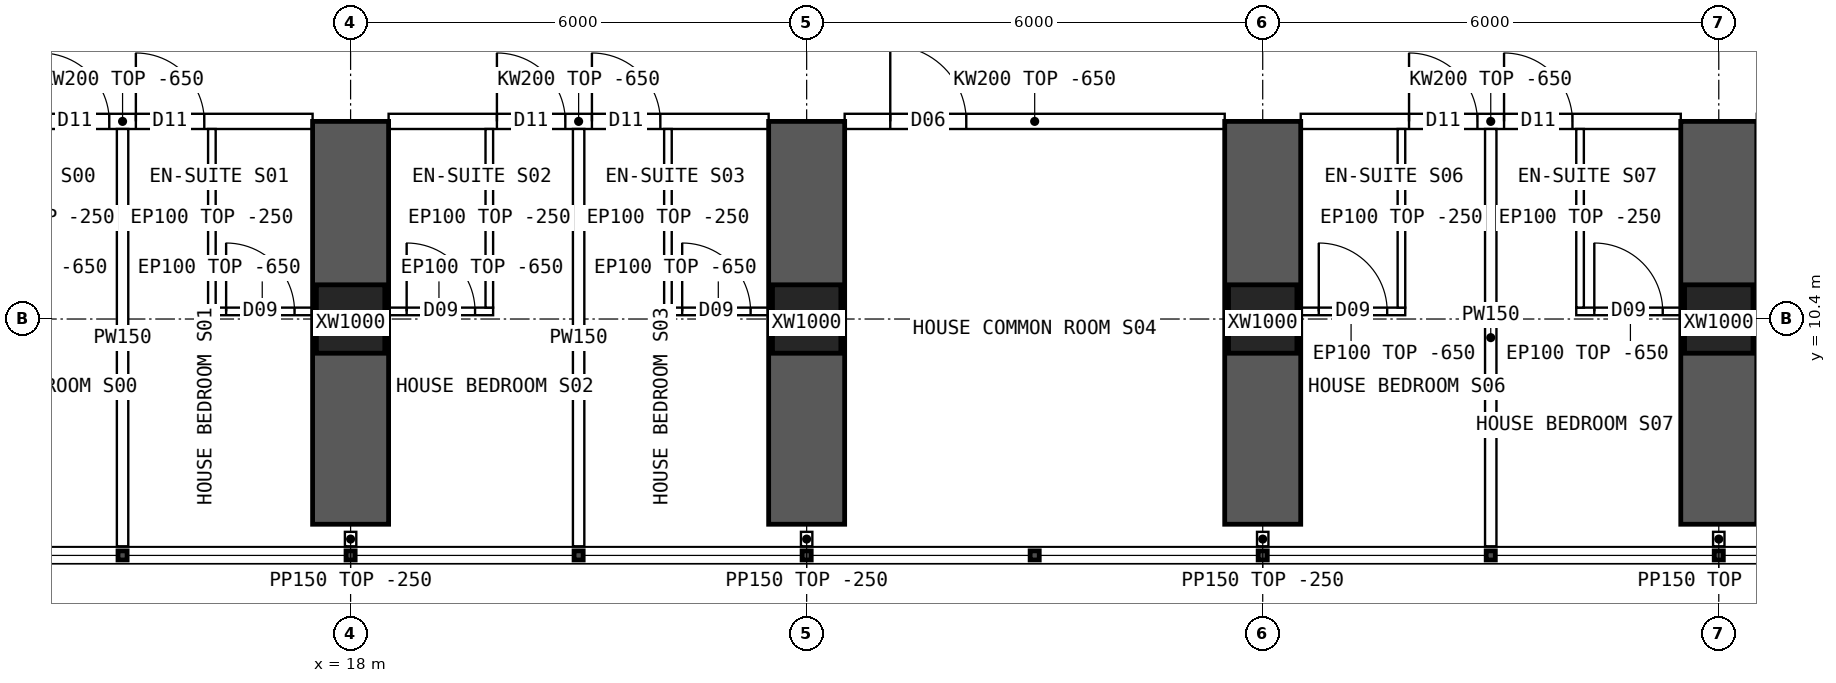
"""IFC4 building model, lengths in metres.
Left out: names, types, materials, properties, quantities, classifications, styles, units other than length and angle.
Written with IfcOpenShell. Run it as: python <this file> out.ifc"""

import sys

from ifc_helpers import new_model, si_unit, direction, frame, frame_2d, origin, origin_2d, place, context, subcontext, project, spatial, polyline, rectangle, hollow_rectangle, outline, extrude, element, fill, save


model = new_model("IFC4")
c1 = context("Model", 3, precision=1e-05, world=origin(), true_north=direction((0.0, 1.0)))
c2 = subcontext(c1, "Body", "Model", "MODEL_VIEW")
j1 = project(units=[si_unit("LENGTHUNIT", "METRE"), si_unit("PLANEANGLEUNIT", "RADIAN")], contexts=[c1])
p1 = place(None, origin())
s1 = spatial("IfcSite", under=j1, at=p1, CompositionType="ELEMENT")
p2 = place(p1, origin())
s2 = spatial("IfcBuilding", under=s1, at=p2, CompositionType="ELEMENT")
p3 = place(p2, frame((0.0, 0.0, 23.95)))
s3 = spatial("IfcBuildingStorey", under=s2, at=p3, CompositionType="ELEMENT", Elevation=23.95)
for number, where, z_axis, x_axis in (
    (1, (18.0, 10.4, 0.0), (0.0, 0.0, 1.0), (1.0, 0.0, 0.0)),
    (2, (24.0, 10.4, 0.0), (0.0, 0.0, 1.0), (1.0, 0.0, 0.0)),
    (3, (30.0, 10.4, 0.0), (0.0, 0.0, 1.0), (1.0, 0.0, 0.0)),
    (4, (36.0, 10.4, 0.0), (0.0, 0.0, 1.0), (1.0, 0.0, 0.0)),
):
    element("IfcColumn", number, at=place(p3, frame(where, z_axis=z_axis, x_axis=x_axis)), inside=s3, PredefinedType="COLUMN", context=c2, shape_type="SweptSolid", body=[
        extrude(hollow_rectangle(XDim=0.9, YDim=0.9, WallThickness=0.09, at=origin_2d()), origin(), (0.0, 0.0, 1.0), 3.75),
    ])
for number, where, z_axis, x_axis in (
    (5, (18.0, 7.7, 0.0), (0.0, 0.0, 1.0), (0.0, 1.0, 0.0)),
    (6, (24.0, 7.7, 0.0), (0.0, 0.0, 1.0), (0.0, 1.0, 0.0)),
    (7, (30.0, 7.7, 0.0), (0.0, 0.0, 1.0), (0.0, 1.0, 0.0)),
    (8, (36.0, 7.7, 0.0), (0.0, 0.0, 1.0), (0.0, 1.0, 0.0)),
):
    element("IfcWall", number, at=place(p3, frame(where, z_axis=z_axis, x_axis=x_axis)), inside=s3, PredefinedType="SHEAR", context=c2, shape_type="SweptSolid", body=[
        extrude(rectangle(XDim=5.3, YDim=1.0, at=frame_2d((2.65, 0.0))), origin(), (0.0, 0.0, 1.0), 3.75),
    ])
p4 = place(p3, frame((12.5, 13.0, 0.0), z_axis=(0.0, 0.0, 1.0), x_axis=(1.0, 0.0, 0.0)))
e9 = element("IfcWall", 9, at=p4, inside=s3, PredefinedType="SOLIDWALL", context=c2, shape_type="SweptSolid", body=[
    extrude(outline(polyline([(0.0, 0.0), (5.0, 0.0), (5.0, 3.1), (0.0, 3.1), (0.0, 0.0)])), frame((0.0, 0.1, 0.0), z_axis=(0.0, -1.0, 0.0), x_axis=(1.0, 0.0, 0.0)), (0.0, 0.0, 1.0), 0.2),
])
p5 = place(p4, frame((1.425, 0.0, 0.0)))
e10 = element("IfcOpeningElement", 10, at=p5, cuts=e9, PredefinedType="OPENING", context=c2, shape_type="SweptSolid", body=[
    extrude(rectangle(XDim=0.9, YDim=2.1, at=frame_2d((0.45, 1.05))), frame((0.0, 0.11, 0.0), z_axis=(0.0, -1.0, 0.0), x_axis=(1.0, 0.0, 0.0)), (0.0, 0.0, 1.0), 0.22),
])
p6 = place(p4, frame((2.675, 0.0, 0.0)))
e11 = element("IfcOpeningElement", 11, at=p6, cuts=e9, PredefinedType="OPENING", context=c2, shape_type="SweptSolid", body=[
    extrude(rectangle(XDim=0.9, YDim=2.1, at=frame_2d((0.45, 1.05))), frame((0.0, 0.11, 0.0), z_axis=(0.0, -1.0, 0.0), x_axis=(1.0, 0.0, 0.0)), (0.0, 0.0, 1.0), 0.22),
])
p7 = place(p3, frame((18.5, 13.0, 0.0), z_axis=(0.0, 0.0, 1.0), x_axis=(1.0, 0.0, 0.0)))
e12 = element("IfcWall", 12, at=p7, inside=s3, PredefinedType="SOLIDWALL", context=c2, shape_type="SweptSolid", body=[
    extrude(outline(polyline([(0.0, 0.0), (5.0, 0.0), (5.0, 3.1), (0.0, 3.1), (0.0, 0.0)])), frame((0.0, 0.1, 0.0), z_axis=(0.0, -1.0, 0.0), x_axis=(1.0, 0.0, 0.0)), (0.0, 0.0, 1.0), 0.2),
])
p8 = place(p7, frame((1.425, 0.0, 0.0)))
e13 = element("IfcOpeningElement", 13, at=p8, cuts=e12, PredefinedType="OPENING", context=c2, shape_type="SweptSolid", body=[
    extrude(rectangle(XDim=0.9, YDim=2.1, at=frame_2d((0.45, 1.05))), frame((0.0, 0.11, 0.0), z_axis=(0.0, -1.0, 0.0), x_axis=(1.0, 0.0, 0.0)), (0.0, 0.0, 1.0), 0.22),
])
p9 = place(p7, frame((2.675, 0.0, 0.0)))
e14 = element("IfcOpeningElement", 14, at=p9, cuts=e12, PredefinedType="OPENING", context=c2, shape_type="SweptSolid", body=[
    extrude(rectangle(XDim=0.9, YDim=2.1, at=frame_2d((0.45, 1.05))), frame((0.0, 0.11, 0.0), z_axis=(0.0, -1.0, 0.0), x_axis=(1.0, 0.0, 0.0)), (0.0, 0.0, 1.0), 0.22),
])
p10 = place(p3, frame((24.5, 13.0, 0.0), z_axis=(0.0, 0.0, 1.0), x_axis=(1.0, 0.0, 0.0)))
e15 = element("IfcWall", 15, at=p10, inside=s3, PredefinedType="SOLIDWALL", context=c2, shape_type="SweptSolid", body=[
    extrude(outline(polyline([(0.0, 0.0), (5.0, 0.0), (5.0, 3.1), (0.0, 3.1), (0.0, 0.0)])), frame((0.0, 0.1, 0.0), z_axis=(0.0, -1.0, 0.0), x_axis=(1.0, 0.0, 0.0)), (0.0, 0.0, 1.0), 0.2),
])
p11 = place(p10, frame((0.6, 0.0, 0.0)))
e16 = element("IfcOpeningElement", 16, at=p11, cuts=e15, PredefinedType="OPENING", context=c2, shape_type="SweptSolid", body=[
    extrude(rectangle(XDim=1.0, YDim=2.1, at=frame_2d((0.5, 1.05))), frame((0.0, 0.11, 0.0), z_axis=(0.0, -1.0, 0.0), x_axis=(1.0, 0.0, 0.0)), (0.0, 0.0, 1.0), 0.22),
])
p12 = place(p3, frame((30.5, 13.0, 0.0), z_axis=(0.0, 0.0, 1.0), x_axis=(1.0, 0.0, 0.0)))
e17 = element("IfcWall", 17, at=p12, inside=s3, PredefinedType="SOLIDWALL", context=c2, shape_type="SweptSolid", body=[
    extrude(outline(polyline([(0.0, 0.0), (5.0, 0.0), (5.0, 3.1), (0.0, 3.1), (0.0, 0.0)])), frame((0.0, 0.1, 0.0), z_axis=(0.0, -1.0, 0.0), x_axis=(1.0, 0.0, 0.0)), (0.0, 0.0, 1.0), 0.2),
])
p13 = place(p12, frame((1.425, 0.0, 0.0)))
e18 = element("IfcOpeningElement", 18, at=p13, cuts=e17, PredefinedType="OPENING", context=c2, shape_type="SweptSolid", body=[
    extrude(rectangle(XDim=0.9, YDim=2.1, at=frame_2d((0.45, 1.05))), frame((0.0, 0.11, 0.0), z_axis=(0.0, -1.0, 0.0), x_axis=(1.0, 0.0, 0.0)), (0.0, 0.0, 1.0), 0.22),
])
p14 = place(p12, frame((2.675, 0.0, 0.0)))
e19 = element("IfcOpeningElement", 19, at=p14, cuts=e17, PredefinedType="OPENING", context=c2, shape_type="SweptSolid", body=[
    extrude(rectangle(XDim=0.9, YDim=2.1, at=frame_2d((0.45, 1.05))), frame((0.0, 0.11, 0.0), z_axis=(0.0, -1.0, 0.0), x_axis=(1.0, 0.0, 0.0)), (0.0, 0.0, 1.0), 0.22),
])
p15 = place(p3, frame((15.0, 7.41, 0.0), z_axis=(0.0, 0.0, 1.0), x_axis=(0.0, 1.0, 0.0)))
e20 = element("IfcWall", 20, at=p15, inside=s3, PredefinedType="PARTITIONING", context=c2, shape_type="SweptSolid", body=[
    extrude(outline(polyline([(0.0, 0.0), (5.49, 0.0), (5.49, 3.1), (5.442, 3.1), (5.44, 3.5), (3.192, 3.5), (3.19, 3.1), (2.792, 3.1), (2.79, 3.5), (0.0, 3.5), (0.0, 0.0)])), frame((0.0, 0.075, 0.0), z_axis=(0.0, -1.0, 0.0), x_axis=(1.0, 0.0, 0.0)), (0.0, 0.0, 1.0), 0.15),
])
p16 = place(p3, frame((17.55, 10.5, 0.0), z_axis=(0.0, 0.0, 1.0), x_axis=(-1.0, 0.0, 0.0)))
e21 = element("IfcWall", 21, at=p16, inside=s3, PredefinedType="PARTITIONING", context=c2, shape_type="SweptSolid", body=[
    extrude(outline(polyline([(0.0, 0.0), (1.425, 0.0), (1.425, 3.1), (0.0, 3.1), (0.0, 0.0)])), frame((0.0, 0.05, 0.0), z_axis=(0.0, -1.0, 0.0), x_axis=(1.0, 0.0, 0.0)), (0.0, 0.0, 1.0), 0.1),
])
p17 = place(p16, frame((0.288, 0.0, 0.0)))
e22 = element("IfcOpeningElement", 22, at=p17, cuts=e21, PredefinedType="OPENING", context=c2, shape_type="SweptSolid", body=[
    extrude(rectangle(XDim=0.9, YDim=2.1, at=frame_2d((0.45, 1.05))), frame((0.0, 0.06, 0.0), z_axis=(0.0, -1.0, 0.0), x_axis=(1.0, 0.0, 0.0)), (0.0, 0.0, 1.0), 0.12),
])
p18 = place(p3, frame((16.175, 10.55, 0.0), z_axis=(0.0, 0.0, 1.0), x_axis=(0.0, 1.0, 0.0)))
e23 = element("IfcWall", 23, at=p18, inside=s3, PredefinedType="PARTITIONING", context=c2, shape_type="SweptSolid", body=[
    extrude(outline(polyline([(0.0, 0.0), (2.35, 0.0), (2.35, 3.1), (2.302, 3.1), (2.3, 3.5), (0.052, 3.5), (0.05, 3.1), (0.0, 3.1), (0.0, 0.0)])), frame((0.0, 0.05, 0.0), z_axis=(0.0, -1.0, 0.0), x_axis=(1.0, 0.0, 0.0)), (0.0, 0.0, 1.0), 0.1),
])
p19 = place(p3, frame((21.0, 7.41, 0.0), z_axis=(0.0, 0.0, 1.0), x_axis=(0.0, 1.0, 0.0)))
e24 = element("IfcWall", 24, at=p19, inside=s3, PredefinedType="PARTITIONING", context=c2, shape_type="SweptSolid", body=[
    extrude(outline(polyline([(0.0, 0.0), (5.49, 0.0), (5.49, 3.1), (5.442, 3.1), (5.44, 3.5), (3.192, 3.5), (3.19, 3.1), (2.792, 3.1), (2.79, 3.5), (0.0, 3.5), (0.0, 0.0)])), frame((0.0, 0.075, 0.0), z_axis=(0.0, -1.0, 0.0), x_axis=(1.0, 0.0, 0.0)), (0.0, 0.0, 1.0), 0.15),
])
p20 = place(p3, frame((19.875, 10.5, 0.0), z_axis=(0.0, 0.0, 1.0), x_axis=(-1.0, 0.0, 0.0)))
e25 = element("IfcWall", 25, at=p20, inside=s3, PredefinedType="PARTITIONING", context=c2, shape_type="SweptSolid", body=[
    extrude(outline(polyline([(0.0, 0.0), (1.425, 0.0), (1.425, 3.1), (0.0, 3.1), (0.0, 0.0)])), frame((0.0, 0.05, 0.0), z_axis=(0.0, -1.0, 0.0), x_axis=(1.0, 0.0, 0.0)), (0.0, 0.0, 1.0), 0.1),
])
p21 = place(p20, frame((0.238, 0.0, 0.0)))
e26 = element("IfcOpeningElement", 26, at=p21, cuts=e25, PredefinedType="OPENING", context=c2, shape_type="SweptSolid", body=[
    extrude(rectangle(XDim=0.9, YDim=2.1, at=frame_2d((0.45, 1.05))), frame((0.0, 0.06, 0.0), z_axis=(0.0, -1.0, 0.0), x_axis=(1.0, 0.0, 0.0)), (0.0, 0.0, 1.0), 0.12),
])
p22 = place(p3, frame((19.825, 10.55, 0.0), z_axis=(0.0, 0.0, 1.0), x_axis=(0.0, 1.0, 0.0)))
e27 = element("IfcWall", 27, at=p22, inside=s3, PredefinedType="PARTITIONING", context=c2, shape_type="SweptSolid", body=[
    extrude(outline(polyline([(0.0, 0.0), (2.35, 0.0), (2.35, 3.1), (2.302, 3.1), (2.3, 3.5), (0.052, 3.5), (0.05, 3.1), (0.0, 3.1), (0.0, 0.0)])), frame((0.0, 0.05, 0.0), z_axis=(0.0, -1.0, 0.0), x_axis=(1.0, 0.0, 0.0)), (0.0, 0.0, 1.0), 0.1),
])
p23 = place(p3, frame((23.55, 10.5, 0.0), z_axis=(0.0, 0.0, 1.0), x_axis=(-1.0, 0.0, 0.0)))
e28 = element("IfcWall", 28, at=p23, inside=s3, PredefinedType="PARTITIONING", context=c2, shape_type="SweptSolid", body=[
    extrude(outline(polyline([(0.0, 0.0), (1.425, 0.0), (1.425, 3.1), (0.0, 3.1), (0.0, 0.0)])), frame((0.0, 0.05, 0.0), z_axis=(0.0, -1.0, 0.0), x_axis=(1.0, 0.0, 0.0)), (0.0, 0.0, 1.0), 0.1),
])
p24 = place(p23, frame((0.288, 0.0, 0.0)))
e29 = element("IfcOpeningElement", 29, at=p24, cuts=e28, PredefinedType="OPENING", context=c2, shape_type="SweptSolid", body=[
    extrude(rectangle(XDim=0.9, YDim=2.1, at=frame_2d((0.45, 1.05))), frame((0.0, 0.06, 0.0), z_axis=(0.0, -1.0, 0.0), x_axis=(1.0, 0.0, 0.0)), (0.0, 0.0, 1.0), 0.12),
])
p25 = place(p3, frame((22.175, 10.55, 0.0), z_axis=(0.0, 0.0, 1.0), x_axis=(0.0, 1.0, 0.0)))
e30 = element("IfcWall", 30, at=p25, inside=s3, PredefinedType="PARTITIONING", context=c2, shape_type="SweptSolid", body=[
    extrude(outline(polyline([(0.0, 0.0), (2.35, 0.0), (2.35, 3.1), (2.302, 3.1), (2.3, 3.5), (0.052, 3.5), (0.05, 3.1), (0.0, 3.1), (0.0, 0.0)])), frame((0.0, 0.05, 0.0), z_axis=(0.0, -1.0, 0.0), x_axis=(1.0, 0.0, 0.0)), (0.0, 0.0, 1.0), 0.1),
])
p26 = place(p3, frame((33.0, 7.41, 0.0), z_axis=(0.0, 0.0, 1.0), x_axis=(0.0, 1.0, 0.0)))
e31 = element("IfcWall", 31, at=p26, inside=s3, PredefinedType="PARTITIONING", context=c2, shape_type="SweptSolid", body=[
    extrude(outline(polyline([(0.0, 0.0), (5.49, 0.0), (5.49, 3.1), (5.442, 3.1), (5.44, 3.5), (3.192, 3.5), (3.19, 3.1), (2.792, 3.1), (2.79, 3.5), (0.0, 3.5), (0.0, 0.0)])), frame((0.0, 0.075, 0.0), z_axis=(0.0, -1.0, 0.0), x_axis=(1.0, 0.0, 0.0)), (0.0, 0.0, 1.0), 0.15),
])
p27 = place(p3, frame((31.875, 10.5, 0.0), z_axis=(0.0, 0.0, 1.0), x_axis=(-1.0, 0.0, 0.0)))
e32 = element("IfcWall", 32, at=p27, inside=s3, PredefinedType="PARTITIONING", context=c2, shape_type="SweptSolid", body=[
    extrude(outline(polyline([(0.0, 0.0), (1.425, 0.0), (1.425, 3.1), (0.0, 3.1), (0.0, 0.0)])), frame((0.0, 0.05, 0.0), z_axis=(0.0, -1.0, 0.0), x_axis=(1.0, 0.0, 0.0)), (0.0, 0.0, 1.0), 0.1),
])
p28 = place(p27, frame((0.238, 0.0, 0.0)))
e33 = element("IfcOpeningElement", 33, at=p28, cuts=e32, PredefinedType="OPENING", context=c2, shape_type="SweptSolid", body=[
    extrude(rectangle(XDim=0.9, YDim=2.1, at=frame_2d((0.45, 1.05))), frame((0.0, 0.06, 0.0), z_axis=(0.0, -1.0, 0.0), x_axis=(1.0, 0.0, 0.0)), (0.0, 0.0, 1.0), 0.12),
])
p29 = place(p3, frame((31.825, 10.55, 0.0), z_axis=(0.0, 0.0, 1.0), x_axis=(0.0, 1.0, 0.0)))
e34 = element("IfcWall", 34, at=p29, inside=s3, PredefinedType="PARTITIONING", context=c2, shape_type="SweptSolid", body=[
    extrude(outline(polyline([(0.0, 0.0), (2.35, 0.0), (2.35, 3.1), (2.302, 3.1), (2.3, 3.5), (0.052, 3.5), (0.05, 3.1), (0.0, 3.1), (0.0, 0.0)])), frame((0.0, 0.05, 0.0), z_axis=(0.0, -1.0, 0.0), x_axis=(1.0, 0.0, 0.0)), (0.0, 0.0, 1.0), 0.1),
])
p30 = place(p3, frame((35.55, 10.5, 0.0), z_axis=(0.0, 0.0, 1.0), x_axis=(-1.0, 0.0, 0.0)))
e35 = element("IfcWall", 35, at=p30, inside=s3, PredefinedType="PARTITIONING", context=c2, shape_type="SweptSolid", body=[
    extrude(outline(polyline([(0.0, 0.0), (1.425, 0.0), (1.425, 3.1), (0.0, 3.1), (0.0, 0.0)])), frame((0.0, 0.05, 0.0), z_axis=(0.0, -1.0, 0.0), x_axis=(1.0, 0.0, 0.0)), (0.0, 0.0, 1.0), 0.1),
])
p31 = place(p30, frame((0.288, 0.0, 0.0)))
e36 = element("IfcOpeningElement", 36, at=p31, cuts=e35, PredefinedType="OPENING", context=c2, shape_type="SweptSolid", body=[
    extrude(rectangle(XDim=0.9, YDim=2.1, at=frame_2d((0.45, 1.05))), frame((0.0, 0.06, 0.0), z_axis=(0.0, -1.0, 0.0), x_axis=(1.0, 0.0, 0.0)), (0.0, 0.0, 1.0), 0.12),
])
p32 = place(p3, frame((34.175, 10.55, 0.0), z_axis=(0.0, 0.0, 1.0), x_axis=(0.0, 1.0, 0.0)))
e37 = element("IfcWall", 37, at=p32, inside=s3, PredefinedType="PARTITIONING", context=c2, shape_type="SweptSolid", body=[
    extrude(outline(polyline([(0.0, 0.0), (2.35, 0.0), (2.35, 3.1), (2.302, 3.1), (2.3, 3.5), (0.052, 3.5), (0.05, 3.1), (0.0, 3.1), (0.0, 0.0)])), frame((0.0, 0.05, 0.0), z_axis=(0.0, -1.0, 0.0), x_axis=(1.0, 0.0, 0.0)), (0.0, 0.0, 1.0), 0.1),
])
for number, where, z_axis, x_axis in (
    (38, (18.0, 7.6, 0.0), (0.0, 0.0, 1.0), (0.0, -1.0, 0.0)),
    (39, (24.0, 7.6, 0.0), (0.0, 0.0, 1.0), (0.0, -1.0, 0.0)),
    (40, (30.0, 7.6, 0.0), (0.0, 0.0, 1.0), (0.0, -1.0, 0.0)),
    (41, (36.0, 7.6, 0.0), (0.0, 0.0, 1.0), (0.0, -1.0, 0.0)),
):
    element("IfcWall", number, at=place(p3, frame(where, z_axis=z_axis, x_axis=x_axis)), inside=s3, PredefinedType="PARTITIONING", context=c2, shape_type="SweptSolid", body=[
        extrude(rectangle(XDim=0.19, YDim=0.15, at=frame_2d((0.095, 0.0))), origin(), (0.0, 0.0, 1.0), 3.5),
    ])
p33 = place(p5, origin())
e42 = element("IfcDoor", 42, at=p33, inside=s3, OperationType="SINGLE_SWING_LEFT", PredefinedType="DOOR", context=c2, shape_type="SweptSolid", body=[
    extrude(rectangle(XDim=0.9, YDim=2.1, at=frame_2d((0.45, 1.05))), frame((0.0, 0.025, 0.0), z_axis=(0.0, -1.0, 0.0), x_axis=(1.0, 0.0, 0.0)), (0.0, 0.0, 1.0), 0.05),
])
fill(e10, e42)
p34 = place(p17, origin())
e43 = element("IfcDoor", 43, at=p34, inside=s3, OperationType="SINGLE_SWING_RIGHT", PredefinedType="DOOR", context=c2, shape_type="SweptSolid", body=[
    extrude(rectangle(XDim=0.9, YDim=2.1, at=frame_2d((0.45, 1.05))), frame((0.0, 0.025, 0.0), z_axis=(0.0, -1.0, 0.0), x_axis=(1.0, 0.0, 0.0)), (0.0, 0.0, 1.0), 0.05),
])
fill(e22, e43)
p35 = place(p6, origin())
e44 = element("IfcDoor", 44, at=p35, inside=s3, OperationType="SINGLE_SWING_LEFT", PredefinedType="DOOR", context=c2, shape_type="SweptSolid", body=[
    extrude(rectangle(XDim=0.9, YDim=2.1, at=frame_2d((0.45, 1.05))), frame((0.0, 0.025, 0.0), z_axis=(0.0, -1.0, 0.0), x_axis=(1.0, 0.0, 0.0)), (0.0, 0.0, 1.0), 0.05),
])
fill(e11, e44)
p36 = place(p21, origin())
e45 = element("IfcDoor", 45, at=p36, inside=s3, OperationType="SINGLE_SWING_RIGHT", PredefinedType="DOOR", context=c2, shape_type="SweptSolid", body=[
    extrude(rectangle(XDim=0.9, YDim=2.1, at=frame_2d((0.45, 1.05))), frame((0.0, 0.025, 0.0), z_axis=(0.0, -1.0, 0.0), x_axis=(1.0, 0.0, 0.0)), (0.0, 0.0, 1.0), 0.05),
])
fill(e26, e45)
p37 = place(p8, origin())
e46 = element("IfcDoor", 46, at=p37, inside=s3, OperationType="SINGLE_SWING_LEFT", PredefinedType="DOOR", context=c2, shape_type="SweptSolid", body=[
    extrude(rectangle(XDim=0.9, YDim=2.1, at=frame_2d((0.45, 1.05))), frame((0.0, 0.025, 0.0), z_axis=(0.0, -1.0, 0.0), x_axis=(1.0, 0.0, 0.0)), (0.0, 0.0, 1.0), 0.05),
])
fill(e13, e46)
p38 = place(p24, origin())
e47 = element("IfcDoor", 47, at=p38, inside=s3, OperationType="SINGLE_SWING_RIGHT", PredefinedType="DOOR", context=c2, shape_type="SweptSolid", body=[
    extrude(rectangle(XDim=0.9, YDim=2.1, at=frame_2d((0.45, 1.05))), frame((0.0, 0.025, 0.0), z_axis=(0.0, -1.0, 0.0), x_axis=(1.0, 0.0, 0.0)), (0.0, 0.0, 1.0), 0.05),
])
fill(e29, e47)
p39 = place(p9, origin())
e48 = element("IfcDoor", 48, at=p39, inside=s3, OperationType="SINGLE_SWING_LEFT", PredefinedType="DOOR", context=c2, shape_type="SweptSolid", body=[
    extrude(rectangle(XDim=0.9, YDim=2.1, at=frame_2d((0.45, 1.05))), frame((0.0, 0.025, 0.0), z_axis=(0.0, -1.0, 0.0), x_axis=(1.0, 0.0, 0.0)), (0.0, 0.0, 1.0), 0.05),
])
fill(e14, e48)
p40 = place(p11, origin())
e49 = element("IfcDoor", 49, at=p40, inside=s3, OperationType="SINGLE_SWING_LEFT", PredefinedType="DOOR", context=c2, shape_type="SweptSolid", body=[
    extrude(rectangle(XDim=1.0, YDim=2.1, at=frame_2d((0.5, 1.05))), frame((0.0, 0.025, 0.0), z_axis=(0.0, -1.0, 0.0), x_axis=(1.0, 0.0, 0.0)), (0.0, 0.0, 1.0), 0.05),
])
fill(e16, e49)
p41 = place(p28, origin())
e50 = element("IfcDoor", 50, at=p41, inside=s3, OperationType="SINGLE_SWING_RIGHT", PredefinedType="DOOR", context=c2, shape_type="SweptSolid", body=[
    extrude(rectangle(XDim=0.9, YDim=2.1, at=frame_2d((0.45, 1.05))), frame((0.0, 0.025, 0.0), z_axis=(0.0, -1.0, 0.0), x_axis=(1.0, 0.0, 0.0)), (0.0, 0.0, 1.0), 0.05),
])
fill(e33, e50)
p42 = place(p13, origin())
e51 = element("IfcDoor", 51, at=p42, inside=s3, OperationType="SINGLE_SWING_LEFT", PredefinedType="DOOR", context=c2, shape_type="SweptSolid", body=[
    extrude(rectangle(XDim=0.9, YDim=2.1, at=frame_2d((0.45, 1.05))), frame((0.0, 0.025, 0.0), z_axis=(0.0, -1.0, 0.0), x_axis=(1.0, 0.0, 0.0)), (0.0, 0.0, 1.0), 0.05),
])
fill(e18, e51)
p43 = place(p31, origin())
e52 = element("IfcDoor", 52, at=p43, inside=s3, OperationType="SINGLE_SWING_RIGHT", PredefinedType="DOOR", context=c2, shape_type="SweptSolid", body=[
    extrude(rectangle(XDim=0.9, YDim=2.1, at=frame_2d((0.45, 1.05))), frame((0.0, 0.025, 0.0), z_axis=(0.0, -1.0, 0.0), x_axis=(1.0, 0.0, 0.0)), (0.0, 0.0, 1.0), 0.05),
])
fill(e36, e52)
p44 = place(p14, origin())
e53 = element("IfcDoor", 53, at=p44, inside=s3, OperationType="SINGLE_SWING_LEFT", PredefinedType="DOOR", context=c2, shape_type="SweptSolid", body=[
    extrude(rectangle(XDim=0.9, YDim=2.1, at=frame_2d((0.45, 1.05))), frame((0.0, 0.025, 0.0), z_axis=(0.0, -1.0, 0.0), x_axis=(1.0, 0.0, 0.0)), (0.0, 0.0, 1.0), 0.05),
])
fill(e19, e53)
save(model, sys.argv[1])
